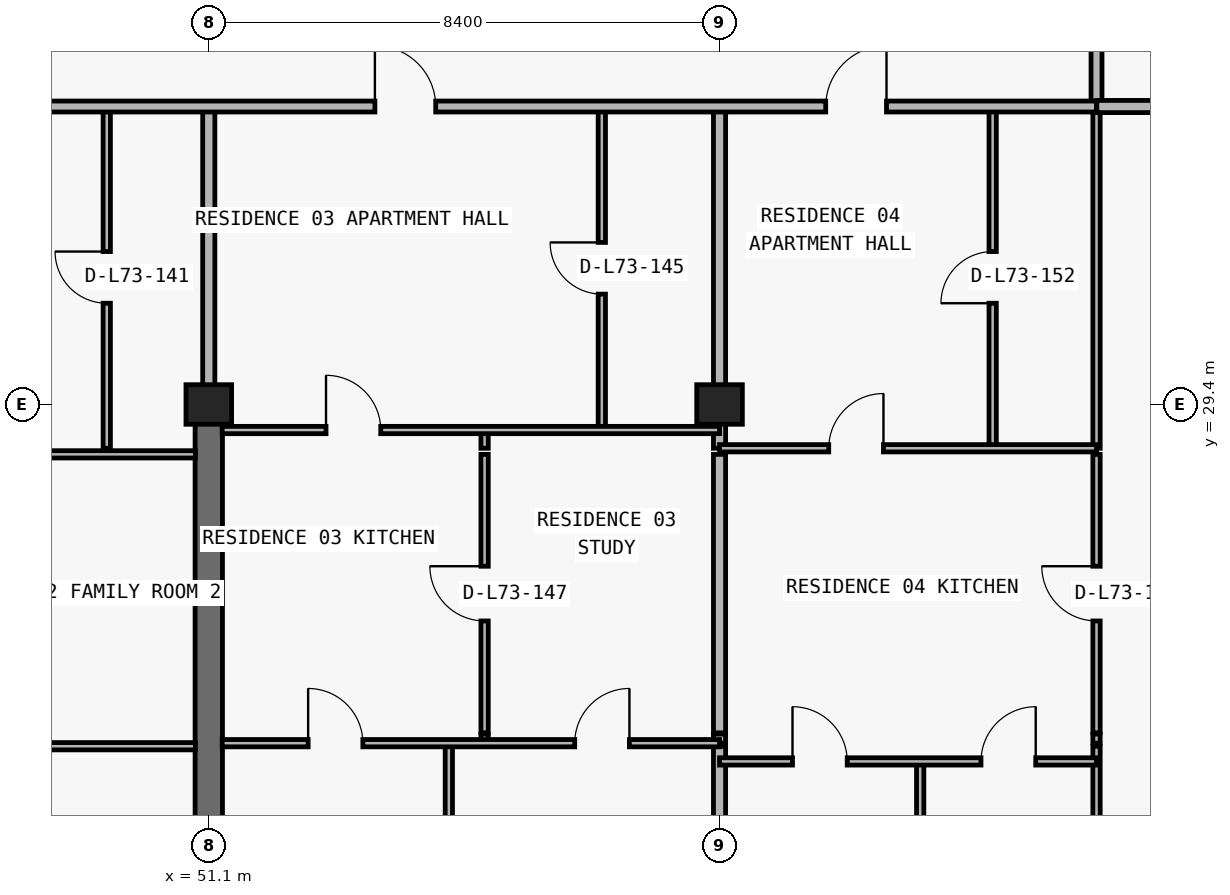
"""IFC4 building model, lengths in metres.
Left out: names, types, materials, properties, quantities, classifications, styles, units other than length and angle.
Written with IfcOpenShell. Run it as: python <this file> out.ifc"""

import sys

from ifc_helpers import new_model, si_unit, direction, frame, frame_2d, origin, origin_2d, place, context, subcontext, project, spatial, rectangle, extrude, element, fill, save


model = new_model("IFC4")
c1 = context("Model", 3, precision=1e-05, world=origin(), true_north=direction((0.0, 1.0)))
c2 = subcontext(c1, "Body", "Model", "MODEL_VIEW")
j1 = project(units=[si_unit("LENGTHUNIT", "METRE"), si_unit("PLANEANGLEUNIT", "RADIAN")], contexts=[c1])
p1 = place(None, origin())
s1 = spatial("IfcSite", under=j1, at=p1, CompositionType="ELEMENT")
p2 = place(p1, origin())
s2 = spatial("IfcBuilding", under=s1, at=p2, CompositionType="ELEMENT")
p3 = place(p2, frame((0.0, 0.0, 259.5)))
s3 = spatial("IfcBuildingStorey", under=s2, at=p3, CompositionType="ELEMENT", Elevation=259.5)
for number, where, z_axis, x_axis in (
    (1, (51.1, 29.4, 0.0), (0.0, 0.0, 1.0), (1.0, 0.0, 0.0)),
    (2, (59.5, 29.4, 0.0), (0.0, 0.0, 1.0), (1.0, 0.0, 0.0)),
):
    element("IfcColumn", number, at=place(p3, frame(where, z_axis=z_axis, x_axis=x_axis)), inside=s3, PredefinedType="COLUMN", context=c2, shape_type="SweptSolid", body=[
        extrude(rectangle(XDim=0.75, YDim=0.65, at=origin_2d()), origin(), (0.0, 0.0, 1.0), 3.05),
    ])
p4 = place(p3, frame((51.1, 20.8, 0.0), z_axis=(0.0, 0.0, 1.0), x_axis=(0.0, 1.0, 0.0)))
e3 = element("IfcWall", 3, at=p4, inside=s3, PredefinedType="SHEAR", context=c2, shape_type="SweptSolid", body=[
    extrude(rectangle(XDim=8.6, YDim=0.45, at=frame_2d((4.3, 0.0))), origin(), (0.0, 0.0, 1.0), 3.05),
])
p5 = place(p3, frame((49.422, 28.68, 0.0), z_axis=(0.0, 0.0, 1.0), x_axis=(0.0, 1.0, 0.0)))
e4 = element("IfcWall", 4, at=p5, inside=s3, PredefinedType="PARTITIONING", context=c2, shape_type="SweptSolid", body=[
    extrude(rectangle(XDim=5.62, YDim=0.12, at=frame_2d((2.81, 0.0))), origin(), (0.0, 0.0, 1.0), 3.05),
])
p6 = place(p5, frame((2.385, 0.0, 0.0)))
e5 = element("IfcOpeningElement", 5, at=p6, cuts=e4, PredefinedType="OPENING", context=c2, shape_type="SweptSolid", body=[
    extrude(rectangle(XDim=0.85, YDim=2.1, at=frame_2d((0.425, 1.05))), frame((0.0, 0.07, 0.0), z_axis=(0.0, -1.0, 0.0), x_axis=(1.0, 0.0, 0.0)), (0.0, 0.0, 1.0), 0.14),
])
p7 = place(p3, frame((51.1, 29.405, 0.0), z_axis=(0.0, 0.0, 1.0), x_axis=(0.0, 1.0, 0.0)))
e6 = element("IfcWall", 6, at=p7, inside=s3, PredefinedType="PARTITIONING", context=c2, shape_type="SweptSolid", body=[
    extrude(rectangle(XDim=4.895, YDim=0.2, at=frame_2d((2.448, 0.0))), origin(), (0.0, 0.0, 1.0), 2.335),
])
p8 = place(p3, frame((55.048, 13.34, 0.0), z_axis=(0.0, 0.0, 1.0), x_axis=(0.0, 1.0, 0.0)))
e7 = element("IfcWall", 7, at=p8, inside=s3, PredefinedType="PARTITIONING", context=c2, shape_type="SweptSolid", body=[
    extrude(rectangle(XDim=10.44, YDim=0.12, at=frame_2d((5.22, 0.0))), origin(), (0.0, 0.0, 1.0), 3.05),
])
p9 = place(p3, frame((55.636, 23.83, 0.0), z_axis=(0.0, 0.0, 1.0), x_axis=(0.0, 1.0, 0.0)))
e8 = element("IfcWall", 8, at=p9, inside=s3, PredefinedType="PARTITIONING", context=c2, shape_type="SweptSolid", body=[
    extrude(rectangle(XDim=0.15, YDim=0.12, at=frame_2d((0.075, 0.0))), origin(), (0.0, 0.0, 1.0), 3.05),
])
p10 = place(p3, frame((55.636, 24.0, 0.0), z_axis=(0.0, 0.0, 1.0), x_axis=(0.0, 1.0, 0.0)))
e9 = element("IfcWall", 9, at=p10, inside=s3, PredefinedType="PARTITIONING", context=c2, shape_type="SweptSolid", body=[
    extrude(rectangle(XDim=4.58, YDim=0.12, at=frame_2d((2.29, 0.0))), origin(), (0.0, 0.0, 1.0), 3.05),
])
p11 = place(p10, frame((1.84, 0.0, 0.0)))
e10 = element("IfcOpeningElement", 10, at=p11, cuts=e9, PredefinedType="OPENING", context=c2, shape_type="SweptSolid", body=[
    extrude(rectangle(XDim=0.9, YDim=2.15, at=frame_2d((0.45, 1.075))), frame((0.0, 0.07, 0.0), z_axis=(0.0, -1.0, 0.0), x_axis=(1.0, 0.0, 0.0)), (0.0, 0.0, 1.0), 0.14),
])
p12 = place(p3, frame((55.636, 28.68, 0.0), z_axis=(0.0, 0.0, 1.0), x_axis=(0.0, 1.0, 0.0)))
e11 = element("IfcWall", 11, at=p12, inside=s3, PredefinedType="PARTITIONING", context=c2, shape_type="SweptSolid", body=[
    extrude(rectangle(XDim=0.3, YDim=0.12, at=frame_2d((0.15, 0.0))), origin(), (0.0, 0.0, 1.0), 3.05),
])
p13 = place(p3, frame((57.564, 28.98, 0.0), z_axis=(0.0, 0.0, 1.0), x_axis=(0.0, 1.0, 0.0)))
e12 = element("IfcWall", 12, at=p13, inside=s3, PredefinedType="PARTITIONING", context=c2, shape_type="SweptSolid", body=[
    extrude(rectangle(XDim=5.32, YDim=0.12, at=frame_2d((2.66, 0.0))), origin(), (0.0, 0.0, 1.0), 2.629),
])
p14 = place(p13, frame((2.235, 0.0, 0.0)))
e13 = element("IfcOpeningElement", 13, at=p14, cuts=e12, PredefinedType="OPENING", context=c2, shape_type="SweptSolid", body=[
    extrude(rectangle(XDim=0.85, YDim=2.1, at=frame_2d((0.425, 1.05))), frame((0.0, 0.07, 0.0), z_axis=(0.0, -1.0, 0.0), x_axis=(1.0, 0.0, 0.0)), (0.0, 0.0, 1.0), 0.14),
])
p15 = place(p3, frame((59.5, 13.34, 0.0), z_axis=(0.0, 0.0, 1.0), x_axis=(0.0, 1.0, 0.0)))
e14 = element("IfcWall", 14, at=p15, inside=s3, PredefinedType="PARTITIONING", context=c2, shape_type="SweptSolid", body=[
    extrude(rectangle(XDim=10.44, YDim=0.2, at=frame_2d((5.22, 0.0))), origin(), (0.0, 0.0, 1.0), 2.263),
])
p16 = place(p3, frame((59.5, 23.83, 0.0), z_axis=(0.0, 0.0, 1.0), x_axis=(0.0, 1.0, 0.0)))
e15 = element("IfcWall", 15, at=p16, inside=s3, PredefinedType="PARTITIONING", context=c2, shape_type="SweptSolid", body=[
    extrude(rectangle(XDim=0.15, YDim=0.2, at=frame_2d((0.075, 0.0))), origin(), (0.0, 0.0, 1.0), 2.263),
])
p17 = place(p3, frame((59.5, 24.0, 0.0), z_axis=(0.0, 0.0, 1.0), x_axis=(0.0, 1.0, 0.0)))
e16 = element("IfcWall", 16, at=p17, inside=s3, PredefinedType="PARTITIONING", context=c2, shape_type="SweptSolid", body=[
    extrude(rectangle(XDim=4.58, YDim=0.2, at=frame_2d((2.29, 0.0))), origin(), (0.0, 0.0, 1.0), 2.263),
])
p18 = place(p3, frame((59.5, 28.68, 0.0), z_axis=(0.0, 0.0, 1.0), x_axis=(0.0, 1.0, 0.0)))
e17 = element("IfcWall", 17, at=p18, inside=s3, PredefinedType="PARTITIONING", context=c2, shape_type="SweptSolid", body=[
    extrude(rectangle(XDim=5.62, YDim=0.2, at=frame_2d((2.81, 0.0))), origin(), (0.0, 0.0, 1.0), 2.263),
])
p19 = place(p3, frame((62.8, 13.34, 0.0), z_axis=(0.0, 0.0, 1.0), x_axis=(0.0, 1.0, 0.0)))
e18 = element("IfcWall", 18, at=p19, inside=s3, PredefinedType="PARTITIONING", context=c2, shape_type="SweptSolid", body=[
    extrude(rectangle(XDim=10.19, YDim=0.12, at=frame_2d((5.095, 0.0))), origin(), (0.0, 0.0, 1.0), 3.05),
])
p20 = place(p3, frame((63.992, 28.68, 0.0), z_axis=(0.0, 0.0, 1.0), x_axis=(0.0, 1.0, 0.0)))
e19 = element("IfcWall", 19, at=p20, inside=s3, PredefinedType="PARTITIONING", context=c2, shape_type="SweptSolid", body=[
    extrude(rectangle(XDim=5.62, YDim=0.12, at=frame_2d((2.81, 0.0))), origin(), (0.0, 0.0, 1.0), 3.05),
])
p21 = place(p20, frame((2.385, 0.0, 0.0)))
e20 = element("IfcOpeningElement", 20, at=p21, cuts=e19, PredefinedType="OPENING", context=c2, shape_type="SweptSolid", body=[
    extrude(rectangle(XDim=0.85, YDim=2.1, at=frame_2d((0.425, 1.05))), frame((0.0, 0.07, 0.0), z_axis=(0.0, -1.0, 0.0), x_axis=(1.0, 0.0, 0.0)), (0.0, 0.0, 1.0), 0.14),
])
p22 = place(p3, frame((65.7, 13.42, 0.0), z_axis=(0.0, 0.0, 1.0), x_axis=(0.0, 1.0, 0.0)))
e21 = element("IfcWall", 21, at=p22, inside=s3, PredefinedType="PARTITIONING", context=c2, shape_type="SweptSolid", body=[
    extrude(rectangle(XDim=10.36, YDim=0.12, at=frame_2d((5.18, 0.0))), origin(), (0.0, 0.0, 1.0), 2.629),
])
p23 = place(p3, frame((65.7, 23.83, 0.0), z_axis=(0.0, 0.0, 1.0), x_axis=(0.0, 1.0, 0.0)))
e22 = element("IfcWall", 22, at=p23, inside=s3, PredefinedType="PARTITIONING", context=c2, shape_type="SweptSolid", body=[
    extrude(rectangle(XDim=0.15, YDim=0.12, at=frame_2d((0.075, 0.0))), origin(), (0.0, 0.0, 1.0), 2.629),
])
p24 = place(p3, frame((65.7, 24.0, 0.0), z_axis=(0.0, 0.0, 1.0), x_axis=(0.0, 1.0, 0.0)))
e23 = element("IfcWall", 23, at=p24, inside=s3, PredefinedType="PARTITIONING", context=c2, shape_type="SweptSolid", body=[
    extrude(rectangle(XDim=4.58, YDim=0.12, at=frame_2d((2.29, 0.0))), origin(), (0.0, 0.0, 1.0), 2.629),
])
p25 = place(p24, frame((1.84, 0.0, 0.0)))
e24 = element("IfcOpeningElement", 24, at=p25, cuts=e23, PredefinedType="OPENING", context=c2, shape_type="SweptSolid", body=[
    extrude(rectangle(XDim=0.9, YDim=2.15, at=frame_2d((0.45, 1.075))), frame((0.0, 0.07, 0.0), z_axis=(0.0, -1.0, 0.0), x_axis=(1.0, 0.0, 0.0)), (0.0, 0.0, 1.0), 0.14),
])
p26 = place(p3, frame((65.7, 28.68, 0.0), z_axis=(0.0, 0.0, 1.0), x_axis=(0.0, 1.0, 0.0)))
e25 = element("IfcWall", 25, at=p26, inside=s3, PredefinedType="PARTITIONING", context=c2, shape_type="SweptSolid", body=[
    extrude(rectangle(XDim=5.62, YDim=0.12, at=frame_2d((2.81, 0.0))), origin(), (0.0, 0.0, 1.0), 2.629),
])
p27 = place(p3, frame((65.7, 34.305, 0.0), z_axis=(0.0, 0.0, 1.0), x_axis=(0.0, 1.0, 0.0)))
e26 = element("IfcWall", 26, at=p27, inside=s3, PredefinedType="PARTITIONING", context=c2, shape_type="SweptSolid", body=[
    extrude(rectangle(XDim=2.695, YDim=0.18, at=frame_2d((1.348, 0.0))), origin(), (0.0, 0.0, 1.0), 2.629),
])
p28 = place(p3, frame((59.5, 23.53, 0.0), z_axis=(0.0, 0.0, 1.0), x_axis=(1.0, 0.0, 0.0)))
e27 = element("IfcWall", 27, at=p28, inside=s3, PredefinedType="PARTITIONING", context=c2, shape_type="SweptSolid", body=[
    extrude(rectangle(XDim=6.2, YDim=0.12, at=frame_2d((3.1, 0.0))), origin(), (0.0, 0.0, 1.0), 3.05),
])
p29 = place(p28, frame((1.2, 0.0, 0.0)))
e28 = element("IfcOpeningElement", 28, at=p29, cuts=e27, PredefinedType="OPENING", context=c2, shape_type="SweptSolid", body=[
    extrude(rectangle(XDim=0.9, YDim=2.15, at=frame_2d((0.45, 1.075))), frame((0.0, 0.07, 0.0), z_axis=(0.0, -1.0, 0.0), x_axis=(1.0, 0.0, 0.0)), (0.0, 0.0, 1.0), 0.14),
])
p30 = place(p28, frame((4.3, 0.0, 0.0)))
e29 = element("IfcOpeningElement", 29, at=p30, cuts=e27, PredefinedType="OPENING", context=c2, shape_type="SweptSolid", body=[
    extrude(rectangle(XDim=0.9, YDim=2.15, at=frame_2d((0.45, 1.075))), frame((0.0, 0.07, 0.0), z_axis=(0.0, -1.0, 0.0), x_axis=(1.0, 0.0, 0.0)), (0.0, 0.0, 1.0), 0.14),
])
p31 = place(p3, frame((42.7, 23.78, 0.0), z_axis=(0.0, 0.0, 1.0), x_axis=(1.0, 0.0, 0.0)))
e30 = element("IfcWall", 30, at=p31, inside=s3, PredefinedType="PARTITIONING", context=c2, shape_type="SweptSolid", body=[
    extrude(rectangle(XDim=8.18, YDim=0.12, at=frame_2d((4.09, 0.0))), origin(), (0.0, 0.0, 1.0), 3.05),
])
p32 = place(p31, frame((3.64, 0.0, 0.0)))
e31 = element("IfcOpeningElement", 31, at=p32, cuts=e30, PredefinedType="OPENING", context=c2, shape_type="SweptSolid", body=[
    extrude(rectangle(XDim=0.9, YDim=2.15, at=frame_2d((0.45, 1.075))), frame((0.0, 0.07, 0.0), z_axis=(0.0, -1.0, 0.0), x_axis=(1.0, 0.0, 0.0)), (0.0, 0.0, 1.0), 0.14),
])
p33 = place(p3, frame((51.32, 23.83, 0.0), z_axis=(0.0, 0.0, 1.0), x_axis=(1.0, 0.0, 0.0)))
e32 = element("IfcWall", 32, at=p33, inside=s3, PredefinedType="PARTITIONING", context=c2, shape_type="SweptSolid", body=[
    extrude(rectangle(XDim=8.18, YDim=0.12, at=frame_2d((4.09, 0.0))), origin(), (0.0, 0.0, 1.0), 3.05),
])
p34 = place(p33, frame((1.414, 0.0, 0.0)))
e33 = element("IfcOpeningElement", 33, at=p34, cuts=e32, PredefinedType="OPENING", context=c2, shape_type="SweptSolid", body=[
    extrude(rectangle(XDim=0.9, YDim=2.15, at=frame_2d((0.45, 1.075))), frame((0.0, 0.07, 0.0), z_axis=(0.0, -1.0, 0.0), x_axis=(1.0, 0.0, 0.0)), (0.0, 0.0, 1.0), 0.14),
])
p35 = place(p33, frame((5.798, 0.0, 0.0)))
e34 = element("IfcOpeningElement", 34, at=p35, cuts=e32, PredefinedType="OPENING", context=c2, shape_type="SweptSolid", body=[
    extrude(rectangle(XDim=0.9, YDim=2.15, at=frame_2d((0.45, 1.075))), frame((0.0, 0.07, 0.0), z_axis=(0.0, -1.0, 0.0), x_axis=(1.0, 0.0, 0.0)), (0.0, 0.0, 1.0), 0.14),
])
p36 = place(p3, frame((42.705, 28.58, 0.0), z_axis=(0.0, 0.0, 1.0), x_axis=(1.0, 0.0, 0.0)))
e35 = element("IfcWall", 35, at=p36, inside=s3, PredefinedType="PARTITIONING", context=c2, shape_type="SweptSolid", body=[
    extrude(rectangle(XDim=8.175, YDim=0.12, at=frame_2d((4.087, 0.0))), origin(), (0.0, 0.0, 1.0), 3.05),
])
p37 = place(p36, frame((2.908, 0.0, 0.0)))
e36 = element("IfcOpeningElement", 36, at=p37, cuts=e35, PredefinedType="OPENING", context=c2, shape_type="SweptSolid", body=[
    extrude(rectangle(XDim=0.9, YDim=2.15, at=frame_2d((0.45, 1.075))), frame((0.0, 0.07, 0.0), z_axis=(0.0, -1.0, 0.0), x_axis=(1.0, 0.0, 0.0)), (0.0, 0.0, 1.0), 0.14),
])
p38 = place(p3, frame((59.5, 28.68, 0.0), z_axis=(0.0, 0.0, 1.0), x_axis=(1.0, 0.0, 0.0)))
e37 = element("IfcWall", 37, at=p38, inside=s3, PredefinedType="PARTITIONING", context=c2, shape_type="SweptSolid", body=[
    extrude(rectangle(XDim=6.2, YDim=0.12, at=frame_2d((3.1, 0.0))), origin(), (0.0, 0.0, 1.0), 3.05),
])
p39 = place(p38, frame((1.796, 0.0, 0.0)))
e38 = element("IfcOpeningElement", 38, at=p39, cuts=e37, PredefinedType="OPENING", context=c2, shape_type="SweptSolid", body=[
    extrude(rectangle(XDim=0.9, YDim=2.15, at=frame_2d((0.45, 1.075))), frame((0.0, 0.07, 0.0), z_axis=(0.0, -1.0, 0.0), x_axis=(1.0, 0.0, 0.0)), (0.0, 0.0, 1.0), 0.14),
])
p40 = place(p3, frame((51.32, 28.98, 0.0), z_axis=(0.0, 0.0, 1.0), x_axis=(1.0, 0.0, 0.0)))
e39 = element("IfcWall", 39, at=p40, inside=s3, PredefinedType="PARTITIONING", context=c2, shape_type="SweptSolid", body=[
    extrude(rectangle(XDim=8.18, YDim=0.12, at=frame_2d((4.09, 0.0))), origin(), (0.0, 0.0, 1.0), 3.05),
])
p41 = place(p40, frame((1.708, 0.0, 0.0)))
e40 = element("IfcOpeningElement", 40, at=p41, cuts=e39, PredefinedType="OPENING", context=c2, shape_type="SweptSolid", body=[
    extrude(rectangle(XDim=0.9, YDim=2.15, at=frame_2d((0.45, 1.075))), frame((0.0, 0.07, 0.0), z_axis=(0.0, -1.0, 0.0), x_axis=(1.0, 0.0, 0.0)), (0.0, 0.0, 1.0), 0.14),
])
p42 = place(p3, frame((12.105, 34.3, 0.0), z_axis=(0.0, 0.0, 1.0), x_axis=(1.0, 0.0, 0.0)))
e41 = element("IfcWall", 41, at=p42, inside=s3, PredefinedType="PARTITIONING", context=c2, shape_type="SweptSolid", body=[
    extrude(rectangle(XDim=53.595, YDim=0.18, at=frame_2d((26.797, 0.0))), origin(), (0.0, 0.0, 1.0), 3.05),
])
p43 = place(p42, frame((1.661, 0.0, 0.0)))
e42 = element("IfcOpeningElement", 42, at=p43, cuts=e41, PredefinedType="OPENING", context=c2, shape_type="SweptSolid", body=[
    extrude(rectangle(XDim=1.0, YDim=2.2, at=frame_2d((0.5, 1.1))), frame((0.0, 0.1, 0.0), z_axis=(0.0, -1.0, 0.0), x_axis=(1.0, 0.0, 0.0)), (0.0, 0.0, 1.0), 0.2),
])
p44 = place(p42, frame((17.438, 0.0, 0.0)))
e43 = element("IfcOpeningElement", 43, at=p44, cuts=e41, PredefinedType="OPENING", context=c2, shape_type="SweptSolid", body=[
    extrude(rectangle(XDim=1.0, YDim=2.2, at=frame_2d((0.5, 1.1))), frame((0.0, 0.1, 0.0), z_axis=(0.0, -1.0, 0.0), x_axis=(1.0, 0.0, 0.0)), (0.0, 0.0, 1.0), 0.2),
])
p45 = place(p42, frame((41.727, 0.0, 0.0)))
e44 = element("IfcOpeningElement", 44, at=p45, cuts=e41, PredefinedType="OPENING", context=c2, shape_type="SweptSolid", body=[
    extrude(rectangle(XDim=1.0, YDim=2.2, at=frame_2d((0.5, 1.1))), frame((0.0, 0.1, 0.0), z_axis=(0.0, -1.0, 0.0), x_axis=(1.0, 0.0, 0.0)), (0.0, 0.0, 1.0), 0.2),
])
p46 = place(p42, frame((49.141, 0.0, 0.0)))
e45 = element("IfcOpeningElement", 45, at=p46, cuts=e41, PredefinedType="OPENING", context=c2, shape_type="SweptSolid", body=[
    extrude(rectangle(XDim=1.0, YDim=2.2, at=frame_2d((0.5, 1.1))), frame((0.0, 0.1, 0.0), z_axis=(0.0, -1.0, 0.0), x_axis=(1.0, 0.0, 0.0)), (0.0, 0.0, 1.0), 0.2),
])
p47 = place(p3, frame((65.705, 34.3, 0.0), z_axis=(0.0, 0.0, 1.0), x_axis=(1.0, 0.0, 0.0)))
e46 = element("IfcWall", 46, at=p47, inside=s3, PredefinedType="PARTITIONING", context=c2, shape_type="SweptSolid", body=[
    extrude(rectangle(XDim=3.7, YDim=0.2, at=frame_2d((1.85, 0.0))), origin(), (0.0, 0.0, 1.0), 3.05),
])
p48 = place(p6, origin())
e47 = element("IfcDoor", 47, at=p48, inside=s3, OperationType="SINGLE_SWING_RIGHT", PredefinedType="DOOR", context=c2, shape_type="SweptSolid", body=[
    extrude(rectangle(XDim=0.85, YDim=2.1, at=frame_2d((0.425, 1.05))), frame((0.0, 0.025, 0.0), z_axis=(0.0, -1.0, 0.0), x_axis=(1.0, 0.0, 0.0)), (0.0, 0.0, 1.0), 0.05),
])
fill(e5, e47)
p49 = place(p45, origin())
e48 = element("IfcDoor", 48, at=p49, inside=s3, OperationType="SINGLE_SWING_LEFT", PredefinedType="DOOR", context=c2, shape_type="SweptSolid", body=[
    extrude(rectangle(XDim=1.0, YDim=2.2, at=frame_2d((0.5, 1.1))), frame((0.0, 0.025, 0.0), z_axis=(0.0, -1.0, 0.0), x_axis=(1.0, 0.0, 0.0)), (0.0, 0.0, 1.0), 0.05),
])
fill(e44, e48)
p50 = place(p14, origin())
e49 = element("IfcDoor", 49, at=p50, inside=s3, OperationType="SINGLE_SWING_RIGHT", PredefinedType="DOOR", context=c2, shape_type="SweptSolid", body=[
    extrude(rectangle(XDim=0.85, YDim=2.1, at=frame_2d((0.425, 1.05))), frame((0.0, 0.025, 0.0), z_axis=(0.0, -1.0, 0.0), x_axis=(1.0, 0.0, 0.0)), (0.0, 0.0, 1.0), 0.05),
])
fill(e13, e49)
p51 = place(p41, origin())
e50 = element("IfcDoor", 50, at=p51, inside=s3, OperationType="SINGLE_SWING_LEFT", PredefinedType="DOOR", context=c2, shape_type="SweptSolid", body=[
    extrude(rectangle(XDim=0.9, YDim=2.15, at=frame_2d((0.45, 1.075))), frame((0.0, 0.025, 0.0), z_axis=(0.0, -1.0, 0.0), x_axis=(1.0, 0.0, 0.0)), (0.0, 0.0, 1.0), 0.05),
])
fill(e40, e50)
p52 = place(p11, origin())
e51 = element("IfcDoor", 51, at=p52, inside=s3, OperationType="SINGLE_SWING_RIGHT", PredefinedType="DOOR", context=c2, shape_type="SweptSolid", body=[
    extrude(rectangle(XDim=0.9, YDim=2.15, at=frame_2d((0.45, 1.075))), frame((0.0, 0.025, 0.0), z_axis=(0.0, -1.0, 0.0), x_axis=(1.0, 0.0, 0.0)), (0.0, 0.0, 1.0), 0.05),
])
fill(e10, e51)
p53 = place(p34, origin())
e52 = element("IfcDoor", 52, at=p53, inside=s3, OperationType="SINGLE_SWING_LEFT", PredefinedType="DOOR", context=c2, shape_type="SweptSolid", body=[
    extrude(rectangle(XDim=0.9, YDim=2.15, at=frame_2d((0.45, 1.075))), frame((0.0, 0.025, 0.0), z_axis=(0.0, -1.0, 0.0), x_axis=(1.0, 0.0, 0.0)), (0.0, 0.0, 1.0), 0.05),
])
fill(e33, e52)
p54 = place(p35, origin())
e53 = element("IfcDoor", 53, at=p54, inside=s3, OperationType="SINGLE_SWING_RIGHT", PredefinedType="DOOR", context=c2, shape_type="SweptSolid", body=[
    extrude(rectangle(XDim=0.9, YDim=2.15, at=frame_2d((0.45, 1.075))), frame((0.0, 0.025, 0.0), z_axis=(0.0, -1.0, 0.0), x_axis=(1.0, 0.0, 0.0)), (0.0, 0.0, 1.0), 0.05),
])
fill(e34, e53)
p55 = place(p46, origin())
e54 = element("IfcDoor", 54, at=p55, inside=s3, OperationType="SINGLE_SWING_RIGHT", PredefinedType="DOOR", context=c2, shape_type="SweptSolid", body=[
    extrude(rectangle(XDim=1.0, YDim=2.2, at=frame_2d((0.5, 1.1))), frame((0.0, 0.025, 0.0), z_axis=(0.0, -1.0, 0.0), x_axis=(1.0, 0.0, 0.0)), (0.0, 0.0, 1.0), 0.05),
])
fill(e45, e54)
p56 = place(p21, origin())
e55 = element("IfcDoor", 55, at=p56, inside=s3, OperationType="SINGLE_SWING_LEFT", PredefinedType="DOOR", context=c2, shape_type="SweptSolid", body=[
    extrude(rectangle(XDim=0.85, YDim=2.1, at=frame_2d((0.425, 1.05))), frame((0.0, 0.025, 0.0), z_axis=(0.0, -1.0, 0.0), x_axis=(1.0, 0.0, 0.0)), (0.0, 0.0, 1.0), 0.05),
])
fill(e20, e55)
p57 = place(p39, origin())
e56 = element("IfcDoor", 56, at=p57, inside=s3, OperationType="SINGLE_SWING_RIGHT", PredefinedType="DOOR", context=c2, shape_type="SweptSolid", body=[
    extrude(rectangle(XDim=0.9, YDim=2.15, at=frame_2d((0.45, 1.075))), frame((0.0, 0.025, 0.0), z_axis=(0.0, -1.0, 0.0), x_axis=(1.0, 0.0, 0.0)), (0.0, 0.0, 1.0), 0.05),
])
fill(e38, e56)
p58 = place(p29, origin())
e57 = element("IfcDoor", 57, at=p58, inside=s3, OperationType="SINGLE_SWING_LEFT", PredefinedType="DOOR", context=c2, shape_type="SweptSolid", body=[
    extrude(rectangle(XDim=0.9, YDim=2.15, at=frame_2d((0.45, 1.075))), frame((0.0, 0.025, 0.0), z_axis=(0.0, -1.0, 0.0), x_axis=(1.0, 0.0, 0.0)), (0.0, 0.0, 1.0), 0.05),
])
fill(e28, e57)
p59 = place(p30, origin())
e58 = element("IfcDoor", 58, at=p59, inside=s3, OperationType="SINGLE_SWING_RIGHT", PredefinedType="DOOR", context=c2, shape_type="SweptSolid", body=[
    extrude(rectangle(XDim=0.9, YDim=2.15, at=frame_2d((0.45, 1.075))), frame((0.0, 0.025, 0.0), z_axis=(0.0, -1.0, 0.0), x_axis=(1.0, 0.0, 0.0)), (0.0, 0.0, 1.0), 0.05),
])
fill(e29, e58)
p60 = place(p25, origin())
e59 = element("IfcDoor", 59, at=p60, inside=s3, OperationType="SINGLE_SWING_RIGHT", PredefinedType="DOOR", context=c2, shape_type="SweptSolid", body=[
    extrude(rectangle(XDim=0.9, YDim=2.15, at=frame_2d((0.45, 1.075))), frame((0.0, 0.025, 0.0), z_axis=(0.0, -1.0, 0.0), x_axis=(1.0, 0.0, 0.0)), (0.0, 0.0, 1.0), 0.05),
])
fill(e24, e59)
save(model, sys.argv[1])
